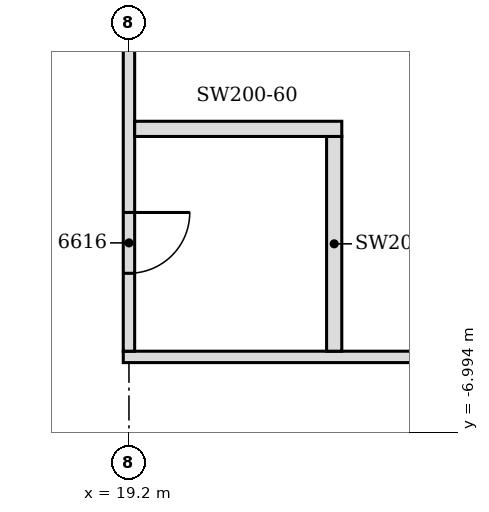
"""IFC4 building model, lengths in metres.
Left out: names, types, materials, properties, quantities, classifications, styles, units other than length and angle.
Written with IfcOpenShell. Run it as: python <this file> out.ifc"""

import sys

from ifc_helpers import new_model, si_unit, direction, frame, frame_2d, origin, place, context, subcontext, project, spatial, polyline, rectangle, outline, extrude, element, fill, save


model = new_model("IFC4")
c1 = context("Model", 3, precision=1e-05, world=origin(), true_north=direction((0.0, 1.0)))
c2 = subcontext(c1, "Body", "Model", "MODEL_VIEW")
j1 = project(units=[si_unit("LENGTHUNIT", "METRE"), si_unit("PLANEANGLEUNIT", "RADIAN")], contexts=[c1])
p1 = place(None, origin())
s1 = spatial("IfcSite", under=j1, at=p1, CompositionType="ELEMENT")
p2 = place(p1, origin())
s2 = spatial("IfcBuilding", under=s1, at=p2, CompositionType="ELEMENT")
p3 = place(p2, frame((0.0, 0.0, 257.4)))
s3 = spatial("IfcBuildingStorey", under=s2, at=p3, CompositionType="ELEMENT", Elevation=257.4)
p4 = place(p3, frame((21.146, -16.672, 0.0), z_axis=(0.0, 0.0, 1.0), x_axis=(0.707106781187, 0.707106781187, 0.0)))
e1 = element("IfcWall", 1, at=p4, inside=s3, PredefinedType="PARTITIONING", context=c2, shape_type="SweptSolid", body=[
    extrude(rectangle(XDim=17.719, YDim=0.15, at=frame_2d((8.859, 0.0))), origin(), (0.0, 0.0, 1.0), 2.78),
])
p5 = place(p4, frame((1.266, 0.0, 0.0)))
e2 = element("IfcOpeningElement", 2, at=p5, cuts=e1, PredefinedType="OPENING", context=c2, shape_type="SweptSolid", body=[
    extrude(rectangle(XDim=0.9, YDim=2.1, at=frame_2d((0.45, 1.05))), frame((0.0, 0.085, 0.0), z_axis=(0.0, -1.0, 0.0), x_axis=(1.0, 0.0, 0.0)), (0.0, 0.0, 1.0), 0.17),
])
p6 = place(p4, frame((8.611, 0.0, 0.0)))
e3 = element("IfcOpeningElement", 3, at=p6, cuts=e1, PredefinedType="OPENING", context=c2, shape_type="SweptSolid", body=[
    extrude(rectangle(XDim=0.9, YDim=2.1, at=frame_2d((0.45, 1.05))), frame((0.0, 0.085, 0.0), z_axis=(0.0, -1.0, 0.0), x_axis=(1.0, 0.0, 0.0)), (0.0, 0.0, 1.0), 0.17),
])
p7 = place(p4, frame((13.012, 0.0, 0.0)))
e4 = element("IfcOpeningElement", 4, at=p7, cuts=e1, PredefinedType="OPENING", context=c2, shape_type="SweptSolid", body=[
    extrude(rectangle(XDim=0.9, YDim=2.1, at=frame_2d((0.45, 1.05))), frame((0.0, 0.085, 0.0), z_axis=(0.0, -1.0, 0.0), x_axis=(1.0, 0.0, 0.0)), (0.0, 0.0, 1.0), 0.17),
])
p8 = place(p3, frame((19.125, -6.0, 0.0), z_axis=(0.0, 0.0, 1.0), x_axis=(1.0, 0.0, 0.0)))
e5 = element("IfcWall", 5, at=p8, inside=s3, PredefinedType="PARTITIONING", context=c2, shape_type="SweptSolid", body=[
    extrude(outline(polyline([(0.0, 0.0), (9.405, 0.0), (9.405, 3.35), (0.225, 3.35), (0.223, 2.73), (0.0, 2.73), (0.0, 0.0)])), frame((0.0, 0.075, 0.0), z_axis=(0.0, -1.0, 0.0), x_axis=(1.0, 0.0, 0.0)), (0.0, 0.0, 1.0), 0.15),
])
p9 = place(p3, frame((19.2, -5.925, 0.0), z_axis=(0.0, 0.0, 1.0), x_axis=(0.0, 1.0, 0.0)))
e6 = element("IfcWall", 6, at=p9, inside=s3, PredefinedType="PARTITIONING", context=c2, shape_type="SweptSolid", body=[
    extrude(rectangle(XDim=8.137, YDim=0.15, at=frame_2d((4.069, 0.0))), origin(), (0.0, 0.0, 1.0), 2.73),
])
p10 = place(p9, frame((1.025, 0.0, 0.0)))
e7 = element("IfcOpeningElement", 7, at=p10, cuts=e6, PredefinedType="OPENING", context=c2, shape_type="SweptSolid", body=[
    extrude(rectangle(XDim=0.8, YDim=2.1, at=frame_2d((0.4, 1.05))), frame((0.0, 0.085, 0.0), z_axis=(0.0, -1.0, 0.0), x_axis=(1.0, 0.0, 0.0)), (0.0, 0.0, 1.0), 0.17),
])
p11 = place(p3, frame((21.9, -5.925, 0.0), z_axis=(0.0, 0.0, 1.0), x_axis=(0.0, 1.0, 0.0)))
e8 = element("IfcWall", 8, at=p11, inside=s3, PredefinedType="PARTITIONING", context=c2, shape_type="SweptSolid", body=[
    extrude(rectangle(XDim=2.825, YDim=0.2, at=frame_2d((1.413, 0.0))), origin(), (0.0, 0.0, 1.0), 3.35),
])
p12 = place(p3, frame((19.275, -3.0, 0.0), z_axis=(0.0, 0.0, 1.0), x_axis=(1.0, 0.0, 0.0)))
e9 = element("IfcWall", 9, at=p12, inside=s3, PredefinedType="PARTITIONING", context=c2, shape_type="SweptSolid", body=[
    extrude(outline(polyline([(0.0, 0.0), (2.725, 0.0), (2.725, 3.35), (0.075, 3.35), (0.073, 2.73), (0.0, 2.73), (0.0, 0.0)])), frame((0.0, 0.1, 0.0), z_axis=(0.0, -1.0, 0.0), x_axis=(1.0, 0.0, 0.0)), (0.0, 0.0, 1.0), 0.2),
])
p13 = place(p10, frame((0.8, 0.0, 0.0), z_axis=(0.0, 0.0, 1.0), x_axis=(-1.0, 0.0, 0.0)))
e10 = element("IfcDoor", 10, at=p13, inside=s3, OperationType="SINGLE_SWING_LEFT", PredefinedType="DOOR", context=c2, shape_type="SweptSolid", body=[
    extrude(rectangle(XDim=0.8, YDim=2.1, at=frame_2d((0.4, 1.05))), frame((0.0, 0.025, 0.0), z_axis=(0.0, -1.0, 0.0), x_axis=(1.0, 0.0, 0.0)), (0.0, 0.0, 1.0), 0.05),
])
fill(e7, e10)
save(model, sys.argv[1])
